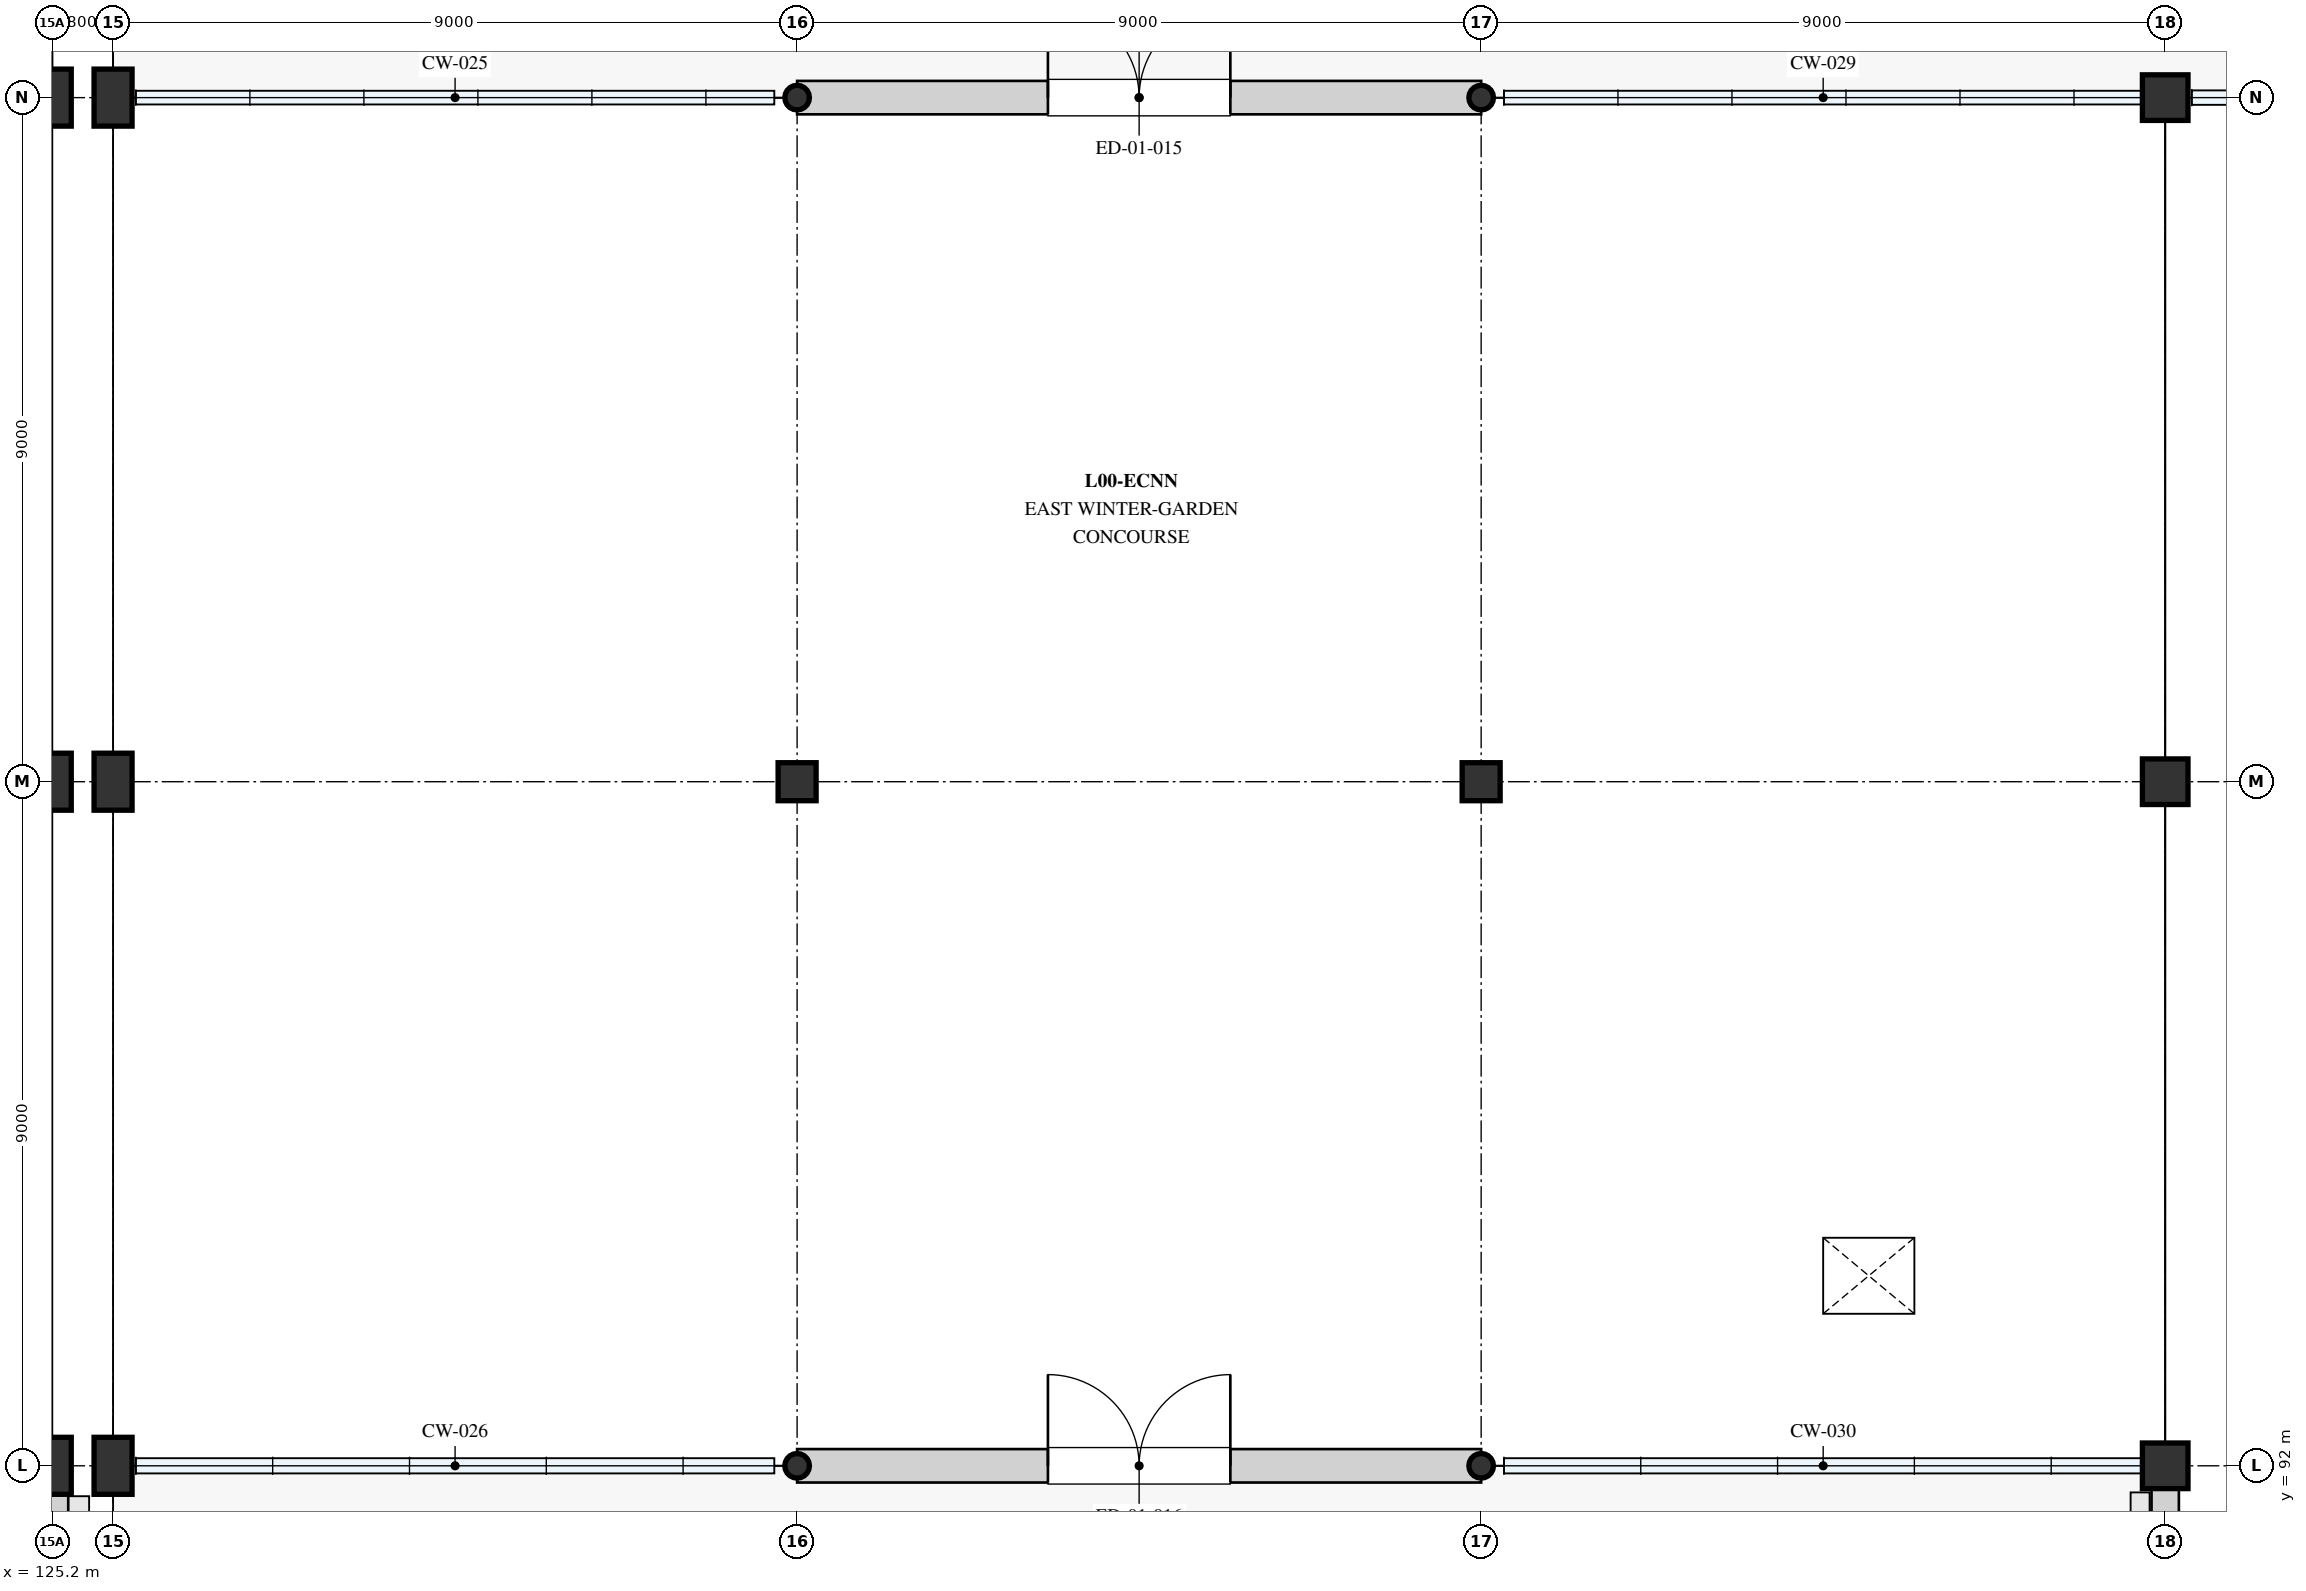
"""IFC4 building model, lengths in metres.
Left out: names, types, materials, properties, quantities, classifications, styles, units other than length and angle.
Written with IfcOpenShell. Run it as: python <this file> out.ifc"""

import sys

from ifc_helpers import new_model, si_unit, direction, frame, frame_2d, origin, origin_2d, place, context, subcontext, project, spatial, rectangle, hollow_circle, extrude, element, fill, save


model = new_model("IFC4")
c1 = context("Model", 3, precision=1e-05, world=origin(), true_north=direction((0.0, 1.0)))
c2 = subcontext(c1, "Body", "Model", "MODEL_VIEW")
j1 = project(units=[si_unit("LENGTHUNIT", "METRE"), si_unit("PLANEANGLEUNIT", "RADIAN")], contexts=[c1])
p1 = place(None, origin())
s1 = spatial("IfcSite", under=j1, at=p1, CompositionType="ELEMENT")
p2 = place(p1, origin())
s2 = spatial("IfcBuilding", under=s1, at=p2, CompositionType="ELEMENT")
p3 = place(p2, origin())
s3 = spatial("IfcBuildingStorey", under=s2, at=p3, CompositionType="ELEMENT", Elevation=0.0)
for number, where, z_axis, x_axis in (
    (1, (125.2, 92.0, 0.0), (0.0, 0.0, 1.0), (1.0, 0.0, 0.0)),
    (2, (125.2, 101.0, 0.0), (0.0, 0.0, 1.0), (1.0, 0.0, 0.0)),
    (3, (125.2, 110.0, 0.0), (0.0, 0.0, 1.0), (1.0, 0.0, 0.0)),
    (4, (126.0, 92.0, 0.0), (0.0, 0.0, 1.0), (1.0, 0.0, 0.0)),
    (5, (126.0, 101.0, 0.0), (0.0, 0.0, 1.0), (1.0, 0.0, 0.0)),
    (6, (126.0, 110.0, 0.0), (0.0, 0.0, 1.0), (1.0, 0.0, 0.0)),
):
    element("IfcColumn", number, at=place(p3, frame(where, z_axis=z_axis, x_axis=x_axis)), inside=s3, PredefinedType="COLUMN", context=c2, shape_type="SweptSolid", body=[
        extrude(rectangle(XDim=0.5, YDim=0.75, at=origin_2d()), origin(), (0.0, 0.0, 1.0), 4.5),
    ])
p4 = place(p3, frame((135.0, 92.0, 0.0), z_axis=(0.0, 0.0, 1.0), x_axis=(1.0, 0.0, 0.0)))
e7 = element("IfcColumn", 7, at=p4, inside=s3, PredefinedType="PILASTER", context=c2, shape_type="SweptSolid", body=[
    extrude(hollow_circle(Radius=0.162, WallThickness=0.012, at=origin_2d()), origin(), (0.0, 0.0, 1.0), 4.5),
])
p5 = place(p3, frame((135.0, 101.0, 0.0), z_axis=(0.0, 0.0, 1.0), x_axis=(1.0, 0.0, 0.0)))
e8 = element("IfcColumn", 8, at=p5, inside=s3, PredefinedType="COLUMN", context=c2, shape_type="SweptSolid", body=[
    extrude(rectangle(XDim=0.5, YDim=0.5, at=origin_2d()), origin(), (0.0, 0.0, 1.0), 4.5),
])
for number, where, z_axis, x_axis in (
    (9, (135.0, 110.0, 0.0), (0.0, 0.0, 1.0), (1.0, 0.0, 0.0)),
    (10, (144.0, 92.0, 0.0), (0.0, 0.0, 1.0), (1.0, 0.0, 0.0)),
):
    element("IfcColumn", number, at=place(p3, frame(where, z_axis=z_axis, x_axis=x_axis)), inside=s3, PredefinedType="PILASTER", context=c2, shape_type="SweptSolid", body=[
        extrude(hollow_circle(Radius=0.162, WallThickness=0.012, at=origin_2d()), origin(), (0.0, 0.0, 1.0), 4.5),
    ])
p6 = place(p3, frame((144.0, 101.0, 0.0), z_axis=(0.0, 0.0, 1.0), x_axis=(1.0, 0.0, 0.0)))
e11 = element("IfcColumn", 11, at=p6, inside=s3, PredefinedType="COLUMN", context=c2, shape_type="SweptSolid", body=[
    extrude(rectangle(XDim=0.5, YDim=0.5, at=origin_2d()), origin(), (0.0, 0.0, 1.0), 4.5),
])
p7 = place(p3, frame((144.0, 110.0, 0.0), z_axis=(0.0, 0.0, 1.0), x_axis=(1.0, 0.0, 0.0)))
e12 = element("IfcColumn", 12, at=p7, inside=s3, PredefinedType="PILASTER", context=c2, shape_type="SweptSolid", body=[
    extrude(hollow_circle(Radius=0.162, WallThickness=0.012, at=origin_2d()), origin(), (0.0, 0.0, 1.0), 4.5),
])
for number, where, z_axis, x_axis in (
    (13, (153.0, 92.0, 0.0), (0.0, 0.0, 1.0), (1.0, 0.0, 0.0)),
    (14, (153.0, 101.0, 0.0), (0.0, 0.0, 1.0), (1.0, 0.0, 0.0)),
    (15, (153.0, 110.0, 0.0), (0.0, 0.0, 1.0), (1.0, 0.0, 0.0)),
):
    element("IfcColumn", number, at=place(p3, frame(where, z_axis=z_axis, x_axis=x_axis)), inside=s3, PredefinedType="COLUMN", context=c2, shape_type="SweptSolid", body=[
        extrude(rectangle(XDim=0.6, YDim=0.6, at=origin_2d()), origin(), (0.0, 0.0, 1.0), 4.5),
    ])
p8 = place(p3, frame((135.0, 110.0, 0.0), z_axis=(0.0, 0.0, 1.0), x_axis=(1.0, 0.0, 0.0)))
e16 = element("IfcWall", 16, at=p8, inside=s3, PredefinedType="STANDARD", context=c2, shape_type="SweptSolid", body=[
    extrude(rectangle(XDim=9.0, YDim=0.44, at=frame_2d((4.5, 0.0))), origin(), (0.0, 0.0, 1.0), 3.52),
])
p9 = place(p8, frame((3.3, 0.0, 0.0)))
e17 = element("IfcOpeningElement", 17, at=p9, cuts=e16, PredefinedType="OPENING", context=c2, shape_type="SweptSolid", body=[
    extrude(rectangle(XDim=2.4, YDim=2.6, at=frame_2d((1.2, 1.3))), frame((0.0, 0.23, 0.0), z_axis=(0.0, -1.0, 0.0), x_axis=(1.0, 0.0, 0.0)), (0.0, 0.0, 1.0), 0.46),
])
p10 = place(p3, frame((135.0, 92.0, 0.0), z_axis=(0.0, 0.0, 1.0), x_axis=(1.0, 0.0, 0.0)))
e18 = element("IfcWall", 18, at=p10, inside=s3, PredefinedType="STANDARD", context=c2, shape_type="SweptSolid", body=[
    extrude(rectangle(XDim=9.0, YDim=0.44, at=frame_2d((4.5, 0.0))), origin(), (0.0, 0.0, 1.0), 3.6),
])
p11 = place(p10, frame((3.3, 0.0, 0.0)))
e19 = element("IfcOpeningElement", 19, at=p11, cuts=e18, PredefinedType="OPENING", context=c2, shape_type="SweptSolid", body=[
    extrude(rectangle(XDim=2.4, YDim=2.6, at=frame_2d((1.2, 1.3))), frame((0.0, 0.23, 0.0), z_axis=(0.0, -1.0, 0.0), x_axis=(1.0, 0.0, 0.0)), (0.0, 0.0, 1.0), 0.46),
])
p12 = place(p3, frame((117.0, 110.0, 0.0), z_axis=(0.0, 0.0, 1.0), x_axis=(1.0, 0.0, 0.0)))
e20 = element("IfcWall", 20, at=p12, inside=s3, PredefinedType="STANDARD", context=c2, shape_type="SweptSolid", body=[
    extrude(rectangle(XDim=8.2, YDim=0.44, at=frame_2d((4.1, 0.0))), origin(), (0.0, 0.0, 1.0), 3.52),
])
p13 = place(p12, frame((2.9, 0.0, 0.0)))
e21 = element("IfcOpeningElement", 21, at=p13, cuts=e20, PredefinedType="OPENING", context=c2, shape_type="SweptSolid", body=[
    extrude(rectangle(XDim=2.4, YDim=2.6, at=frame_2d((1.2, 1.3))), frame((0.0, 0.23, 0.0), z_axis=(0.0, -1.0, 0.0), x_axis=(1.0, 0.0, 0.0)), (0.0, 0.0, 1.0), 0.46),
])
p14 = place(p3, frame((125.2, 83.0, 0.0), z_axis=(0.0, 0.0, 1.0), x_axis=(0.0, 1.0, 0.0)))
e22 = element("IfcWall", 22, at=p14, inside=s3, PredefinedType="STANDARD", context=c2, shape_type="SweptSolid", body=[
    extrude(rectangle(XDim=9.0, YDim=0.42, at=frame_2d((4.5, 0.0))), origin(), (0.0, 0.0, 1.0), 3.37),
])
p15 = place(p14, frame((1.8, 0.0, 0.59)))
e23 = element("IfcOpeningElement", 23, at=p15, cuts=e22, PredefinedType="OPENING", context=c2, shape_type="SweptSolid", body=[
    extrude(rectangle(XDim=2.4, YDim=2.6, at=frame_2d((1.2, 1.3))), frame((0.0, 0.22, 0.0), z_axis=(0.0, -1.0, 0.0), x_axis=(1.0, 0.0, 0.0)), (0.0, 0.0, 1.0), 0.44),
])
p16 = place(p14, frame((4.8, 0.0, 0.59)))
e24 = element("IfcOpeningElement", 24, at=p16, cuts=e22, PredefinedType="OPENING", context=c2, shape_type="SweptSolid", body=[
    extrude(rectangle(XDim=2.4, YDim=2.6, at=frame_2d((1.2, 1.3))), frame((0.0, 0.22, 0.0), z_axis=(0.0, -1.0, 0.0), x_axis=(1.0, 0.0, 0.0)), (0.0, 0.0, 1.0), 0.44),
])
p17 = place(p3, frame((153.0, 83.0, 0.0), z_axis=(0.0, 0.0, 1.0), x_axis=(0.0, 1.0, 0.0)))
e25 = element("IfcWall", 25, at=p17, inside=s3, PredefinedType="STANDARD", context=c2, shape_type="SweptSolid", body=[
    extrude(rectangle(XDim=9.0, YDim=0.36, at=frame_2d((4.5, 0.0))), origin(), (0.0, 0.0, 1.0), 3.36),
])
p18 = place(p17, frame((3.75, 0.0, 0.8)))
e26 = element("IfcOpeningElement", 26, at=p18, cuts=e25, PredefinedType="OPENING", context=c2, shape_type="SweptSolid", body=[
    extrude(rectangle(XDim=1.5, YDim=2.2, at=frame_2d((0.75, 1.1))), frame((0.0, 0.19, 0.0), z_axis=(0.0, -1.0, 0.0), x_axis=(1.0, 0.0, 0.0)), (0.0, 0.0, 1.0), 0.38),
])
p19 = place(p9, origin())
e27 = element("IfcDoor", 27, at=p19, inside=s3, OperationType="DOUBLE_DOOR_SINGLE_SWING", PredefinedType="DOOR", context=c2, shape_type="SweptSolid", body=[
    extrude(rectangle(XDim=2.4, YDim=2.6, at=frame_2d((1.2, 1.3))), frame((0.0, 0.025, 0.0), z_axis=(0.0, -1.0, 0.0), x_axis=(1.0, 0.0, 0.0)), (0.0, 0.0, 1.0), 0.05),
])
fill(e17, e27)
p20 = place(p11, origin())
e28 = element("IfcDoor", 28, at=p20, inside=s3, OperationType="DOUBLE_DOOR_SINGLE_SWING", PredefinedType="DOOR", context=c2, shape_type="SweptSolid", body=[
    extrude(rectangle(XDim=2.4, YDim=2.6, at=frame_2d((1.2, 1.3))), frame((0.0, 0.025, 0.0), z_axis=(0.0, -1.0, 0.0), x_axis=(1.0, 0.0, 0.0)), (0.0, 0.0, 1.0), 0.05),
])
fill(e19, e28)
save(model, sys.argv[1])
